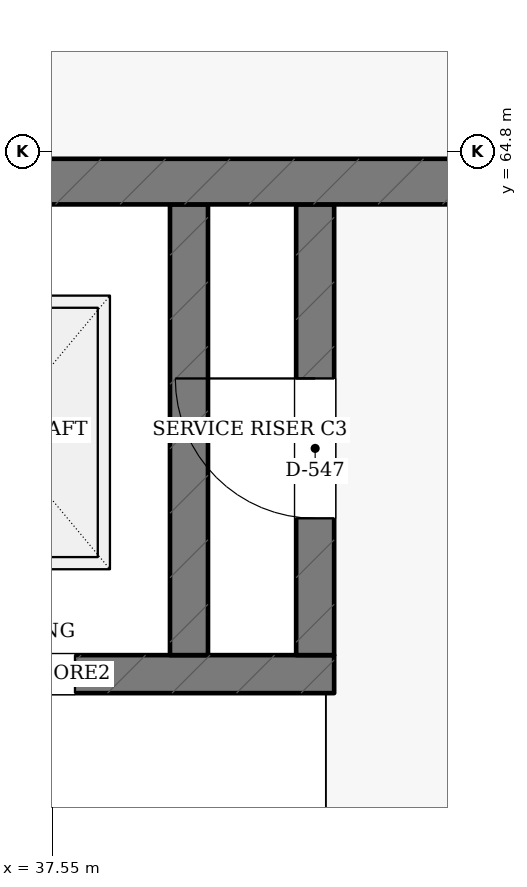
"""IFC4 building model, lengths in metres.
Left out: names, types, materials, properties, quantities, classifications, styles, units other than length and angle.
Written with IfcOpenShell. Run it as: python <this file> out.ifc"""

import sys

from ifc_helpers import new_model, si_unit, direction, frame, frame_2d, origin, place, context, subcontext, project, spatial, rectangle, extrude, element, fill, save


model = new_model("IFC4")
c1 = context("Model", 3, precision=1e-05, world=origin(), true_north=direction((0.0, 1.0)))
c2 = subcontext(c1, "Body", "Model", "MODEL_VIEW")
j1 = project(units=[si_unit("LENGTHUNIT", "METRE"), si_unit("PLANEANGLEUNIT", "RADIAN")], contexts=[c1])
p1 = place(None, origin())
s1 = spatial("IfcSite", under=j1, at=p1, CompositionType="ELEMENT")
p2 = place(p1, origin())
s2 = spatial("IfcBuilding", under=s1, at=p2, CompositionType="ELEMENT")
p3 = place(p2, frame((0.0, 0.0, 5.4)))
s3 = spatial("IfcBuildingStorey", under=s2, at=p3, CompositionType="ELEMENT", Elevation=5.4)
p4 = place(p3, frame((35.825, 61.36, 0.0), z_axis=(0.0, 0.0, 1.0), x_axis=(1.0, 0.0, 0.0)))
e1 = element("IfcWall", 1, at=p4, inside=s3, PredefinedType="SHEAR", context=c2, shape_type="SweptSolid", body=[
    extrude(rectangle(XDim=3.58, YDim=0.25, at=frame_2d((1.79, 0.0))), origin(), (0.0, 0.0, 1.0), 3.55),
])
p5 = place(p4, frame((0.775, 0.0, 0.0)))
e2 = element("IfcOpeningElement", 2, at=p5, cuts=e1, PredefinedType="OPENING", context=c2, shape_type="SweptSolid", body=[
    extrude(rectangle(XDim=1.1, YDim=2.15, at=frame_2d((0.55, 1.075))), frame((0.0, 0.135, 0.0), z_axis=(0.0, -1.0, 0.0), x_axis=(1.0, 0.0, 0.0)), (0.0, 0.0, 1.0), 0.27),
])
p6 = place(p3, frame((38.45, 61.485, 0.0), z_axis=(0.0, 0.0, 1.0), x_axis=(0.0, 1.0, 0.0)))
e3 = element("IfcWall", 3, at=p6, inside=s3, PredefinedType="SHEAR", context=c2, shape_type="SweptSolid", body=[
    extrude(rectangle(XDim=2.965, YDim=0.25, at=frame_2d((1.482, 0.0))), origin(), (0.0, 0.0, 1.0), 3.55),
])
p7 = place(p3, frame((39.28, 61.485, 0.0), z_axis=(0.0, 0.0, 1.0), x_axis=(0.0, 1.0, 0.0)))
e4 = element("IfcWall", 4, at=p7, inside=s3, PredefinedType="SHEAR", context=c2, shape_type="SweptSolid", body=[
    extrude(rectangle(XDim=2.965, YDim=0.25, at=frame_2d((1.482, 0.0))), origin(), (0.0, 0.0, 1.0), 3.55),
])
p8 = place(p7, frame((0.9, 0.0, 0.0)))
e5 = element("IfcOpeningElement", 5, at=p8, cuts=e4, PredefinedType="OPENING", context=c2, shape_type="SweptSolid", body=[
    extrude(rectangle(XDim=0.92, YDim=2.05, at=frame_2d((0.46, 1.025))), frame((0.0, 0.135, 0.0), z_axis=(0.0, -1.0, 0.0), x_axis=(1.0, 0.0, 0.0)), (0.0, 0.0, 1.0), 0.27),
])
p9 = place(p3, frame((28.85, 64.6, 0.0), z_axis=(0.0, 0.0, 1.0), x_axis=(1.0, 0.0, 0.0)))
e6 = element("IfcWall", 6, at=p9, inside=s3, PredefinedType="SHEAR", context=c2, shape_type="SweptSolid", body=[
    extrude(rectangle(XDim=14.35, YDim=0.3, at=frame_2d((7.175, 0.0))), origin(), (0.0, 0.0, 1.0), 3.55),
])
p10 = place(p5, origin())
e7 = element("IfcDoor", 7, at=p10, inside=s3, OperationType="SLIDING_TO_LEFT", PredefinedType="DOOR", context=c2, shape_type="SweptSolid", body=[
    extrude(rectangle(XDim=1.1, YDim=2.15, at=frame_2d((0.55, 1.075))), frame((0.0, 0.025, 0.0), z_axis=(0.0, -1.0, 0.0), x_axis=(1.0, 0.0, 0.0)), (0.0, 0.0, 1.0), 0.05),
])
fill(e2, e7)
p11 = place(p8, origin())
e8 = element("IfcDoor", 8, at=p11, inside=s3, OperationType="SINGLE_SWING_RIGHT", PredefinedType="DOOR", context=c2, shape_type="SweptSolid", body=[
    extrude(rectangle(XDim=0.92, YDim=2.05, at=frame_2d((0.46, 1.025))), frame((0.0, 0.025, 0.0), z_axis=(0.0, -1.0, 0.0), x_axis=(1.0, 0.0, 0.0)), (0.0, 0.0, 1.0), 0.05),
])
fill(e5, e8)
save(model, sys.argv[1])
